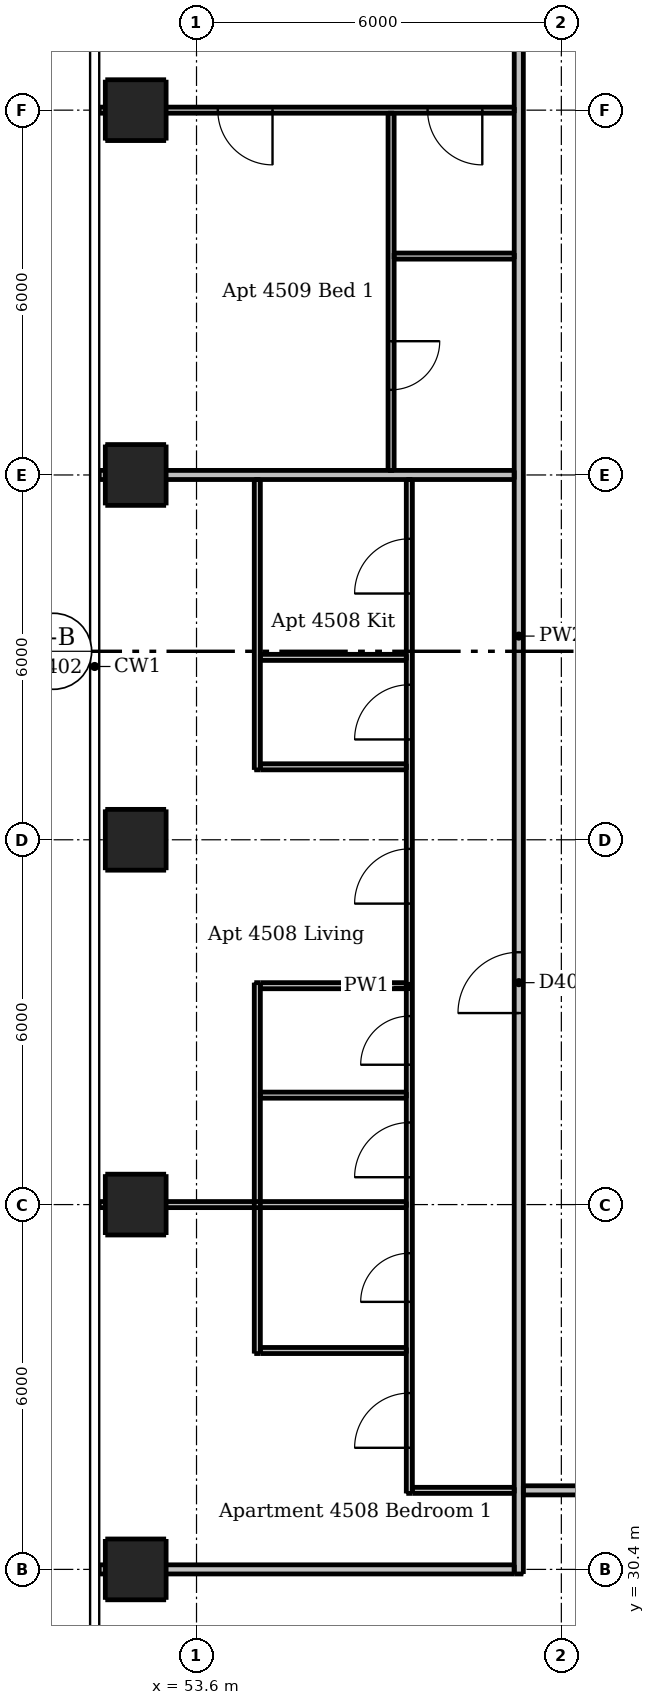
"""IFC4 building model, lengths in metres.
Left out: names, types, materials, properties, quantities, classifications, styles, units other than length and angle.
Written with IfcOpenShell. Run it as: python <this file> out.ifc"""

import sys

from ifc_helpers import new_model, si_unit, direction, frame, frame_2d, origin, origin_2d, place, context, subcontext, project, spatial, rectangle, extrude, element, fill, save


model = new_model("IFC4")
c1 = context("Model", 3, precision=1e-05, world=origin(), true_north=direction((0.0, 1.0)))
c2 = subcontext(c1, "Body", "Model", "MODEL_VIEW")
j1 = project(units=[si_unit("LENGTHUNIT", "METRE"), si_unit("PLANEANGLEUNIT", "RADIAN")], contexts=[c1])
p1 = place(None, origin())
s1 = spatial("IfcSite", under=j1, at=p1, CompositionType="ELEMENT")
p2 = place(p1, origin())
s2 = spatial("IfcBuilding", under=s1, at=p2, CompositionType="ELEMENT")
p3 = place(p2, frame((0.0, 0.0, 168.1)))
s3 = spatial("IfcBuildingStorey", under=s2, at=p3, CompositionType="ELEMENT", Elevation=168.1)
for number, where, z_axis, x_axis in (
    (1, (52.6, 30.4, 0.0), (0.0, 0.0, 1.0), (1.0, 0.0, 0.0)),
    (2, (52.6, 36.4, 0.0), (0.0, 0.0, 1.0), (1.0, 0.0, 0.0)),
    (3, (52.6, 42.4, 0.0), (0.0, 0.0, 1.0), (1.0, 0.0, 0.0)),
    (4, (52.6, 48.4, 0.0), (0.0, 0.0, 1.0), (1.0, 0.0, 0.0)),
    (5, (52.6, 54.4, 0.0), (0.0, 0.0, 1.0), (1.0, 0.0, 0.0)),
):
    element("IfcColumn", number, at=place(p3, frame(where, z_axis=z_axis, x_axis=x_axis)), inside=s3, PredefinedType="COLUMN", context=c2, shape_type="SweptSolid", body=[
        extrude(rectangle(XDim=1.0, YDim=1.0, at=origin_2d()), origin(), (0.0, 0.0, 1.0), 3.05),
    ])
p4 = place(p3, frame((54.6, 33.95, 0.0), z_axis=(0.0, 0.0, 1.0), x_axis=(0.0, 1.0, 0.0)))
e6 = element("IfcWall", 6, at=p4, inside=s3, PredefinedType="PARTITIONING", context=c2, shape_type="SweptSolid", body=[
    extrude(rectangle(XDim=6.1, YDim=0.1, at=frame_2d((3.05, 0.0))), origin(), (0.0, 0.0, 1.0), 3.05),
])
p5 = place(p3, frame((54.6, 43.55, 0.0), z_axis=(0.0, 0.0, 1.0), x_axis=(0.0, 1.0, 0.0)))
e7 = element("IfcWall", 7, at=p5, inside=s3, PredefinedType="PARTITIONING", context=c2, shape_type="SweptSolid", body=[
    extrude(rectangle(XDim=4.775, YDim=0.1, at=frame_2d((2.387, 0.0))), origin(), (0.0, 0.0, 1.0), 3.05),
])
p6 = place(p3, frame((56.8, 54.35, 0.0), z_axis=(0.0, 0.0, 1.0), x_axis=(0.0, -1.0, 0.0)))
e8 = element("IfcWall", 8, at=p6, inside=s3, PredefinedType="PARTITIONING", context=c2, shape_type="SweptSolid", body=[
    extrude(rectangle(XDim=5.875, YDim=0.1, at=frame_2d((2.938, 0.0))), origin(), (0.0, 0.0, 1.0), 3.05),
])
p7 = place(p6, frame((3.75, 0.0, 0.0)))
e9 = element("IfcOpeningElement", 9, at=p7, cuts=e8, PredefinedType="OPENING", context=c2, shape_type="SweptSolid", body=[
    extrude(rectangle(XDim=0.8, YDim=2.1, at=frame_2d((0.4, 1.05))), frame((0.0, 0.06, 0.0), z_axis=(0.0, -1.0, 0.0), x_axis=(1.0, 0.0, 0.0)), (0.0, 0.0, 1.0), 0.12),
])
p8 = place(p3, frame((57.1, 31.65, 0.0), z_axis=(0.0, 0.0, 1.0), x_axis=(0.0, 1.0, 0.0)))
e10 = element("IfcWall", 10, at=p8, inside=s3, PredefinedType="PARTITIONING", context=c2, shape_type="SweptSolid", body=[
    extrude(rectangle(XDim=16.675, YDim=0.1, at=frame_2d((8.337, 0.0))), origin(), (0.0, 0.0, 1.0), 3.05),
])
p9 = place(p8, frame((9.7, 0.0, 0.0)))
e11 = element("IfcOpeningElement", 11, at=p9, cuts=e10, PredefinedType="OPENING", context=c2, shape_type="SweptSolid", body=[
    extrude(rectangle(XDim=0.9, YDim=2.1, at=frame_2d((0.45, 1.05))), frame((0.0, 0.06, 0.0), z_axis=(0.0, -1.0, 0.0), x_axis=(1.0, 0.0, 0.0)), (0.0, 0.0, 1.0), 0.12),
])
p10 = place(p8, frame((14.8, 0.0, 0.0)))
e12 = element("IfcOpeningElement", 12, at=p10, cuts=e10, PredefinedType="OPENING", context=c2, shape_type="SweptSolid", body=[
    extrude(rectangle(XDim=0.9, YDim=2.1, at=frame_2d((0.45, 1.05))), frame((0.0, 0.06, 0.0), z_axis=(0.0, -1.0, 0.0), x_axis=(1.0, 0.0, 0.0)), (0.0, 0.0, 1.0), 0.12),
])
p11 = place(p8, frame((12.4, 0.0, 0.0)))
e13 = element("IfcOpeningElement", 13, at=p11, cuts=e10, PredefinedType="OPENING", context=c2, shape_type="SweptSolid", body=[
    extrude(rectangle(XDim=0.9, YDim=2.1, at=frame_2d((0.45, 1.05))), frame((0.0, 0.06, 0.0), z_axis=(0.0, -1.0, 0.0), x_axis=(1.0, 0.0, 0.0)), (0.0, 0.0, 1.0), 0.12),
])
p12 = place(p8, frame((5.2, 0.0, 0.0)))
e14 = element("IfcOpeningElement", 14, at=p12, cuts=e10, PredefinedType="OPENING", context=c2, shape_type="SweptSolid", body=[
    extrude(rectangle(XDim=0.9, YDim=2.1, at=frame_2d((0.45, 1.05))), frame((0.0, 0.06, 0.0), z_axis=(0.0, -1.0, 0.0), x_axis=(1.0, 0.0, 0.0)), (0.0, 0.0, 1.0), 0.12),
])
p13 = place(p8, frame((7.05, 0.0, 0.0)))
e15 = element("IfcOpeningElement", 15, at=p13, cuts=e10, PredefinedType="OPENING", context=c2, shape_type="SweptSolid", body=[
    extrude(rectangle(XDim=0.8, YDim=2.1, at=frame_2d((0.4, 1.05))), frame((0.0, 0.06, 0.0), z_axis=(0.0, -1.0, 0.0), x_axis=(1.0, 0.0, 0.0)), (0.0, 0.0, 1.0), 0.12),
])
p14 = place(p8, frame((0.75, 0.0, 0.0)))
e16 = element("IfcOpeningElement", 16, at=p14, cuts=e10, PredefinedType="OPENING", context=c2, shape_type="SweptSolid", body=[
    extrude(rectangle(XDim=0.9, YDim=2.1, at=frame_2d((0.45, 1.05))), frame((0.0, 0.06, 0.0), z_axis=(0.0, -1.0, 0.0), x_axis=(1.0, 0.0, 0.0)), (0.0, 0.0, 1.0), 0.12),
])
p15 = place(p8, frame((3.15, 0.0, 0.0)))
e17 = element("IfcOpeningElement", 17, at=p15, cuts=e10, PredefinedType="OPENING", context=c2, shape_type="SweptSolid", body=[
    extrude(rectangle(XDim=0.8, YDim=2.1, at=frame_2d((0.4, 1.05))), frame((0.0, 0.06, 0.0), z_axis=(0.0, -1.0, 0.0), x_axis=(1.0, 0.0, 0.0)), (0.0, 0.0, 1.0), 0.12),
])
p16 = place(p3, frame((58.825, 54.4, 0.0), z_axis=(0.0, 0.0, 1.0), x_axis=(-1.0, 0.0, 0.0)))
e18 = element("IfcWall", 18, at=p16, inside=s3, PredefinedType="PARTITIONING", context=c2, shape_type="SweptSolid", body=[
    extrude(rectangle(XDim=6.825, YDim=0.1, at=frame_2d((3.413, 0.0))), origin(), (0.0, 0.0, 1.0), 2.516),
])
p17 = place(p16, frame((0.525, 0.0, 0.0)))
e19 = element("IfcOpeningElement", 19, at=p17, cuts=e18, PredefinedType="OPENING", context=c2, shape_type="SweptSolid", body=[
    extrude(rectangle(XDim=0.9, YDim=2.1, at=frame_2d((0.45, 1.05))), frame((0.0, 0.06, 0.0), z_axis=(0.0, -1.0, 0.0), x_axis=(1.0, 0.0, 0.0)), (0.0, 0.0, 1.0), 0.12),
])
p18 = place(p16, frame((3.975, 0.0, 0.0)))
e20 = element("IfcOpeningElement", 20, at=p18, cuts=e18, PredefinedType="OPENING", context=c2, shape_type="SweptSolid", body=[
    extrude(rectangle(XDim=0.9, YDim=2.1, at=frame_2d((0.45, 1.05))), frame((0.0, 0.06, 0.0), z_axis=(0.0, -1.0, 0.0), x_axis=(1.0, 0.0, 0.0)), (0.0, 0.0, 1.0), 0.12),
])
p19 = place(p3, frame((56.85, 52.0, 0.0), z_axis=(0.0, 0.0, 1.0), x_axis=(1.0, 0.0, 0.0)))
e21 = element("IfcWall", 21, at=p19, inside=s3, PredefinedType="PARTITIONING", context=c2, shape_type="SweptSolid", body=[
    extrude(rectangle(XDim=1.975, YDim=0.1, at=frame_2d((0.987, 0.0))), origin(), (0.0, 0.0, 1.0), 3.05),
])
for number, where, z_axis, x_axis in (
    (22, (54.65, 45.4, 0.0), (0.0, 0.0, 1.0), (1.0, 0.0, 0.0)),
    (23, (54.65, 43.6, 0.0), (0.0, 0.0, 1.0), (1.0, 0.0, 0.0)),
    (24, (54.65, 40.0, 0.0), (0.0, 0.0, 1.0), (1.0, 0.0, 0.0)),
    (25, (54.65, 38.2, 0.0), (0.0, 0.0, 1.0), (1.0, 0.0, 0.0)),
):
    element("IfcWall", number, at=place(p3, frame(where, z_axis=z_axis, x_axis=x_axis)), inside=s3, PredefinedType="PARTITIONING", context=c2, shape_type="SweptSolid", body=[
        extrude(rectangle(XDim=2.4, YDim=0.1, at=frame_2d((1.2, 0.0))), origin(), (0.0, 0.0, 1.0), 3.05),
    ])
p20 = place(p3, frame((52.0, 36.4, 0.0), z_axis=(0.0, 0.0, 1.0), x_axis=(1.0, 0.0, 0.0)))
e26 = element("IfcWall", 26, at=p20, inside=s3, PredefinedType="PARTITIONING", context=c2, shape_type="SweptSolid", body=[
    extrude(rectangle(XDim=5.05, YDim=0.1, at=frame_2d((2.525, 0.0))), origin(), (0.0, 0.0, 1.0), 2.516),
])
p21 = place(p3, frame((54.65, 34.0, 0.0), z_axis=(0.0, 0.0, 1.0), x_axis=(1.0, 0.0, 0.0)))
e27 = element("IfcWall", 27, at=p21, inside=s3, PredefinedType="PARTITIONING", context=c2, shape_type="SweptSolid", body=[
    extrude(rectangle(XDim=2.4, YDim=0.1, at=frame_2d((1.2, 0.0))), origin(), (0.0, 0.0, 1.0), 3.05),
])
p22 = place(p3, frame((57.15, 31.7, 0.0), z_axis=(0.0, 0.0, 1.0), x_axis=(1.0, 0.0, 0.0)))
e28 = element("IfcWall", 28, at=p22, inside=s3, PredefinedType="PARTITIONING", context=c2, shape_type="SweptSolid", body=[
    extrude(rectangle(XDim=1.675, YDim=0.1, at=frame_2d((0.837, 0.0))), origin(), (0.0, 0.0, 1.0), 3.05),
])
p23 = place(p3, frame((58.9, 30.325, 0.0), z_axis=(0.0, 0.0, 1.0), x_axis=(0.0, 1.0, 0.0)))
e29 = element("IfcWall", 29, at=p23, inside=s3, PredefinedType="PARTITIONING", context=c2, shape_type="SweptSolid", body=[
    extrude(rectangle(XDim=30.85, YDim=0.15, at=frame_2d((15.425, 0.0))), origin(), (0.0, 0.0, 1.0), 3.05),
])
p24 = place(p23, frame((9.225, 0.0, 0.0)))
e30 = element("IfcOpeningElement", 30, at=p24, cuts=e29, PredefinedType="OPENING", context=c2, shape_type="SweptSolid", body=[
    extrude(rectangle(XDim=1.0, YDim=2.1, at=frame_2d((0.5, 1.05))), frame((0.0, 0.085, 0.0), z_axis=(0.0, -1.0, 0.0), x_axis=(1.0, 0.0, 0.0)), (0.0, 0.0, 1.0), 0.17),
])
p25 = place(p23, frame((26.925, 0.0, 0.0)))
e31 = element("IfcOpeningElement", 31, at=p25, cuts=e29, PredefinedType="OPENING", context=c2, shape_type="SweptSolid", body=[
    extrude(rectangle(XDim=1.0, YDim=2.1, at=frame_2d((0.5, 1.05))), frame((0.0, 0.085, 0.0), z_axis=(0.0, -1.0, 0.0), x_axis=(1.0, 0.0, 0.0)), (0.0, 0.0, 1.0), 0.17),
])
p26 = place(p3, frame((52.0, 48.4, 0.0), z_axis=(0.0, 0.0, 1.0), x_axis=(1.0, 0.0, 0.0)))
e32 = element("IfcWall", 32, at=p26, inside=s3, PredefinedType="PARTITIONING", context=c2, shape_type="SweptSolid", body=[
    extrude(rectangle(XDim=6.825, YDim=0.15, at=frame_2d((3.413, 0.0))), origin(), (0.0, 0.0, 1.0), 2.516),
])
p27 = place(p3, frame((89.525, 31.7, 0.0), z_axis=(0.0, 0.0, 1.0), x_axis=(-1.0, 0.0, 0.0)))
e33 = element("IfcWall", 33, at=p27, inside=s3, PredefinedType="PARTITIONING", context=c2, shape_type="SweptSolid", body=[
    extrude(rectangle(XDim=30.55, YDim=0.15, at=frame_2d((15.275, 0.0))), origin(), (0.0, 0.0, 1.0), 3.05),
])
p28 = place(p27, frame((28.275, 0.0, 0.0)))
e34 = element("IfcOpeningElement", 34, at=p28, cuts=e33, PredefinedType="OPENING", context=c2, shape_type="SweptSolid", body=[
    extrude(rectangle(XDim=1.0, YDim=2.1, at=frame_2d((0.5, 1.05))), frame((0.0, 0.085, 0.0), z_axis=(0.0, -1.0, 0.0), x_axis=(1.0, 0.0, 0.0)), (0.0, 0.0, 1.0), 0.17),
])
p29 = place(p27, frame((9.925, 0.0, 0.0)))
e35 = element("IfcOpeningElement", 35, at=p29, cuts=e33, PredefinedType="OPENING", context=c2, shape_type="SweptSolid", body=[
    extrude(rectangle(XDim=1.0, YDim=2.1, at=frame_2d((0.5, 1.05))), frame((0.0, 0.085, 0.0), z_axis=(0.0, -1.0, 0.0), x_axis=(1.0, 0.0, 0.0)), (0.0, 0.0, 1.0), 0.17),
])
p30 = place(p3, frame((52.0, 30.4, 0.0), z_axis=(0.0, 0.0, 1.0), x_axis=(1.0, 0.0, 0.0)))
e36 = element("IfcWall", 36, at=p30, inside=s3, PredefinedType="PARTITIONING", context=c2, shape_type="SweptSolid", body=[
    extrude(rectangle(XDim=6.825, YDim=0.15, at=frame_2d((3.413, 0.0))), origin(), (0.0, 0.0, 1.0), 2.647),
])
p31 = place(p24, origin())
e37 = element("IfcDoor", 37, at=p31, inside=s3, OperationType="SINGLE_SWING_LEFT", PredefinedType="DOOR", context=c2, shape_type="SweptSolid", body=[
    extrude(rectangle(XDim=1.0, YDim=2.1, at=frame_2d((0.5, 1.05))), frame((0.0, 0.025, 0.0), z_axis=(0.0, -1.0, 0.0), x_axis=(1.0, 0.0, 0.0)), (0.0, 0.0, 1.0), 0.05),
])
fill(e30, e37)
p32 = place(p9, origin())
e38 = element("IfcDoor", 38, at=p32, inside=s3, OperationType="SINGLE_SWING_LEFT", PredefinedType="DOOR", context=c2, shape_type="SweptSolid", body=[
    extrude(rectangle(XDim=0.9, YDim=2.1, at=frame_2d((0.45, 1.05))), frame((0.0, 0.025, 0.0), z_axis=(0.0, -1.0, 0.0), x_axis=(1.0, 0.0, 0.0)), (0.0, 0.0, 1.0), 0.05),
])
fill(e11, e38)
p33 = place(p10, origin())
e39 = element("IfcDoor", 39, at=p33, inside=s3, OperationType="SINGLE_SWING_LEFT", PredefinedType="DOOR", context=c2, shape_type="SweptSolid", body=[
    extrude(rectangle(XDim=0.9, YDim=2.1, at=frame_2d((0.45, 1.05))), frame((0.0, 0.025, 0.0), z_axis=(0.0, -1.0, 0.0), x_axis=(1.0, 0.0, 0.0)), (0.0, 0.0, 1.0), 0.05),
])
fill(e12, e39)
p34 = place(p11, origin())
e40 = element("IfcDoor", 40, at=p34, inside=s3, OperationType="SINGLE_SWING_LEFT", PredefinedType="DOOR", context=c2, shape_type="SweptSolid", body=[
    extrude(rectangle(XDim=0.9, YDim=2.1, at=frame_2d((0.45, 1.05))), frame((0.0, 0.025, 0.0), z_axis=(0.0, -1.0, 0.0), x_axis=(1.0, 0.0, 0.0)), (0.0, 0.0, 1.0), 0.05),
])
fill(e13, e40)
p35 = place(p12, origin())
e41 = element("IfcDoor", 41, at=p35, inside=s3, OperationType="SINGLE_SWING_LEFT", PredefinedType="DOOR", context=c2, shape_type="SweptSolid", body=[
    extrude(rectangle(XDim=0.9, YDim=2.1, at=frame_2d((0.45, 1.05))), frame((0.0, 0.025, 0.0), z_axis=(0.0, -1.0, 0.0), x_axis=(1.0, 0.0, 0.0)), (0.0, 0.0, 1.0), 0.05),
])
fill(e14, e41)
p36 = place(p13, origin())
e42 = element("IfcDoor", 42, at=p36, inside=s3, OperationType="SINGLE_SWING_LEFT", PredefinedType="DOOR", context=c2, shape_type="SweptSolid", body=[
    extrude(rectangle(XDim=0.8, YDim=2.1, at=frame_2d((0.4, 1.05))), frame((0.0, 0.025, 0.0), z_axis=(0.0, -1.0, 0.0), x_axis=(1.0, 0.0, 0.0)), (0.0, 0.0, 1.0), 0.05),
])
fill(e15, e42)
p37 = place(p14, origin())
e43 = element("IfcDoor", 43, at=p37, inside=s3, OperationType="SINGLE_SWING_LEFT", PredefinedType="DOOR", context=c2, shape_type="SweptSolid", body=[
    extrude(rectangle(XDim=0.9, YDim=2.1, at=frame_2d((0.45, 1.05))), frame((0.0, 0.025, 0.0), z_axis=(0.0, -1.0, 0.0), x_axis=(1.0, 0.0, 0.0)), (0.0, 0.0, 1.0), 0.05),
])
fill(e16, e43)
p38 = place(p15, origin())
e44 = element("IfcDoor", 44, at=p38, inside=s3, OperationType="SINGLE_SWING_LEFT", PredefinedType="DOOR", context=c2, shape_type="SweptSolid", body=[
    extrude(rectangle(XDim=0.8, YDim=2.1, at=frame_2d((0.4, 1.05))), frame((0.0, 0.025, 0.0), z_axis=(0.0, -1.0, 0.0), x_axis=(1.0, 0.0, 0.0)), (0.0, 0.0, 1.0), 0.05),
])
fill(e17, e44)
p39 = place(p17, origin())
e45 = element("IfcDoor", 45, at=p39, inside=s3, OperationType="SINGLE_SWING_LEFT", PredefinedType="DOOR", context=c2, shape_type="SweptSolid", body=[
    extrude(rectangle(XDim=0.9, YDim=2.1, at=frame_2d((0.45, 1.05))), frame((0.0, 0.025, 0.0), z_axis=(0.0, -1.0, 0.0), x_axis=(1.0, 0.0, 0.0)), (0.0, 0.0, 1.0), 0.05),
])
fill(e19, e45)
p40 = place(p18, origin())
e46 = element("IfcDoor", 46, at=p40, inside=s3, OperationType="SINGLE_SWING_LEFT", PredefinedType="DOOR", context=c2, shape_type="SweptSolid", body=[
    extrude(rectangle(XDim=0.9, YDim=2.1, at=frame_2d((0.45, 1.05))), frame((0.0, 0.025, 0.0), z_axis=(0.0, -1.0, 0.0), x_axis=(1.0, 0.0, 0.0)), (0.0, 0.0, 1.0), 0.05),
])
fill(e20, e46)
p41 = place(p7, origin())
e47 = element("IfcDoor", 47, at=p41, inside=s3, OperationType="SINGLE_SWING_LEFT", PredefinedType="DOOR", context=c2, shape_type="SweptSolid", body=[
    extrude(rectangle(XDim=0.8, YDim=2.1, at=frame_2d((0.4, 1.05))), frame((0.0, 0.025, 0.0), z_axis=(0.0, -1.0, 0.0), x_axis=(1.0, 0.0, 0.0)), (0.0, 0.0, 1.0), 0.05),
])
fill(e9, e47)
save(model, sys.argv[1])
